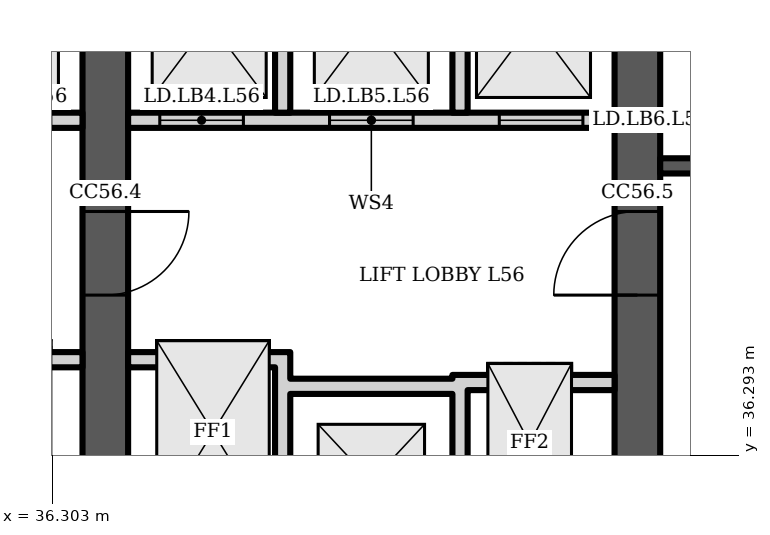
"""IFC4 building model, lengths in metres.
Left out: names, types, materials, properties, quantities, classifications, styles, units other than length and angle.
Written with IfcOpenShell. Run it as: python <this file> out.ifc"""

import sys

from ifc_helpers import new_model, si_unit, direction, frame, frame_2d, origin, place, context, subcontext, project, spatial, polyline, rectangle, outline, extrude, element, fill, save


model = new_model("IFC4")
c1 = context("Model", 3, precision=1e-05, world=origin(), true_north=direction((0.0, 1.0)))
c2 = subcontext(c1, "Body", "Model", "MODEL_VIEW")
j1 = project(units=[si_unit("LENGTHUNIT", "METRE"), si_unit("PLANEANGLEUNIT", "RADIAN")], contexts=[c1])
p1 = place(None, origin())
s1 = spatial("IfcSite", under=j1, at=p1, CompositionType="ELEMENT")
p2 = place(p1, origin())
s2 = spatial("IfcBuilding", under=s1, at=p2, CompositionType="ELEMENT")
p3 = place(p2, frame((0.0, 0.0, 225.1)))
s3 = spatial("IfcBuildingStorey", under=s2, at=p3, CompositionType="ELEMENT", Elevation=225.1)
p4 = place(p3, frame((37.0, 34.6, 0.0), z_axis=(0.0, 0.0, 1.0), x_axis=(0.0, 1.0, 0.0)))
e1 = element("IfcWall", 1, at=p4, inside=s3, PredefinedType="SHEAR", context=c2, shape_type="SweptSolid", body=[
    extrude(rectangle(XDim=14.784, YDim=0.6, at=frame_2d((7.392, 0.0))), origin(), (0.0, 0.0, 1.0), 3.6),
])
p5 = place(p4, frame((11.302, 0.0, 0.0)))
e2 = element("IfcOpeningElement", 2, at=p5, cuts=e1, PredefinedType="OPENING", context=c2, shape_type="SweptSolid", body=[
    extrude(rectangle(XDim=1.0, YDim=2.1, at=frame_2d((0.5, 1.05))), frame((0.0, 0.31, 0.0), z_axis=(0.0, -1.0, 0.0), x_axis=(1.0, 0.0, 0.0)), (0.0, 0.0, 1.0), 0.62),
])
p6 = place(p4, frame((3.8, 0.0, 0.0)))
e3 = element("IfcOpeningElement", 3, at=p6, cuts=e1, PredefinedType="OPENING", context=c2, shape_type="SweptSolid", body=[
    extrude(rectangle(XDim=1.1, YDim=2.1, at=frame_2d((0.55, 1.05))), frame((0.0, 0.31, 0.0), z_axis=(0.0, -1.0, 0.0), x_axis=(1.0, 0.0, 0.0)), (0.0, 0.0, 1.0), 0.62),
])
p7 = place(p3, frame((44.0, 34.6, 0.0), z_axis=(0.0, 0.0, 1.0), x_axis=(0.0, 1.0, 0.0)))
e4 = element("IfcWall", 4, at=p7, inside=s3, PredefinedType="SHEAR", context=c2, shape_type="SweptSolid", body=[
    extrude(rectangle(XDim=14.784, YDim=0.6, at=frame_2d((7.392, 0.0))), origin(), (0.0, 0.0, 1.0), 3.6),
])
p8 = place(p7, frame((11.608, 0.0, 0.0)))
e5 = element("IfcOpeningElement", 5, at=p8, cuts=e4, PredefinedType="OPENING", context=c2, shape_type="SweptSolid", body=[
    extrude(rectangle(XDim=1.0, YDim=2.1, at=frame_2d((0.5, 1.05))), frame((0.0, 0.31, 0.0), z_axis=(0.0, -1.0, 0.0), x_axis=(1.0, 0.0, 0.0)), (0.0, 0.0, 1.0), 0.62),
])
p9 = place(p7, frame((3.8, 0.0, 0.0)))
e6 = element("IfcOpeningElement", 6, at=p9, cuts=e4, PredefinedType="OPENING", context=c2, shape_type="SweptSolid", body=[
    extrude(rectangle(XDim=1.1, YDim=2.1, at=frame_2d((0.55, 1.05))), frame((0.0, 0.31, 0.0), z_axis=(0.0, -1.0, 0.0), x_axis=(1.0, 0.0, 0.0)), (0.0, 0.0, 1.0), 0.62),
])
p10 = place(p3, frame((30.3, 40.7, 0.0), z_axis=(0.0, 0.0, 1.0), x_axis=(1.0, 0.0, 0.0)))
e7 = element("IfcWall", 7, at=p10, inside=s3, PredefinedType="PARTITIONING", context=c2, shape_type="SweptSolid", body=[
    extrude(rectangle(XDim=6.4, YDim=0.2, at=frame_2d((3.2, 0.0))), origin(), (0.0, 0.0, 1.0), 3.2),
])
p11 = place(p10, frame((0.417, 0.0, 0.0)))
e8 = element("IfcOpeningElement", 8, at=p11, cuts=e7, PredefinedType="OPENING", context=c2, shape_type="SweptSolid", body=[
    extrude(rectangle(XDim=1.1, YDim=2.1, at=frame_2d((0.55, 1.05))), frame((0.0, 0.11, 0.0), z_axis=(0.0, -1.0, 0.0), x_axis=(1.0, 0.0, 0.0)), (0.0, 0.0, 1.0), 0.22),
])
p12 = place(p10, frame((2.65, 0.0, 0.0)))
e9 = element("IfcOpeningElement", 9, at=p12, cuts=e7, PredefinedType="OPENING", context=c2, shape_type="SweptSolid", body=[
    extrude(rectangle(XDim=1.1, YDim=2.1, at=frame_2d((0.55, 1.05))), frame((0.0, 0.11, 0.0), z_axis=(0.0, -1.0, 0.0), x_axis=(1.0, 0.0, 0.0)), (0.0, 0.0, 1.0), 0.22),
])
p13 = place(p10, frame((4.883, 0.0, 0.0)))
e10 = element("IfcOpeningElement", 10, at=p13, cuts=e7, PredefinedType="OPENING", context=c2, shape_type="SweptSolid", body=[
    extrude(rectangle(XDim=1.1, YDim=2.1, at=frame_2d((0.55, 1.05))), frame((0.0, 0.11, 0.0), z_axis=(0.0, -1.0, 0.0), x_axis=(1.0, 0.0, 0.0)), (0.0, 0.0, 1.0), 0.22),
])
p14 = place(p3, frame((0.0, 0.0, -0.0)))
e11 = element("IfcWall", 11, at=p14, inside=s3, PredefinedType="PARTITIONING", context=c2, shape_type="SweptSolid", body=[
    extrude(outline(polyline([(34.567, 37.65), (34.767, 37.65), (36.7, 37.65), (36.7, 37.45), (34.767, 37.45), (34.767, 34.6), (34.567, 34.6), (34.567, 37.65)])), origin(), (0.0, 0.0, 1.0), 3.2),
])
p15 = place(p3, frame((0.0, 0.0, -0.0)))
e12 = element("IfcWall", 12, at=p15, inside=s3, PredefinedType="PARTITIONING", context=c2, shape_type="SweptSolid", body=[
    extrude(outline(polyline([(32.433, 40.8), (32.233, 40.8), (32.233, 43.8), (30.3, 43.8), (30.3, 44.0), (36.7, 44.0), (36.7, 43.8), (34.767, 43.8), (34.767, 40.8), (34.567, 40.8), (34.567, 43.8), (32.433, 43.8), (32.433, 40.8)])), origin(), (0.0, 0.0, 1.0), 3.2),
])
p16 = place(p3, frame((37.3, 40.7, 0.0), z_axis=(0.0, 0.0, 1.0), x_axis=(1.0, 0.0, 0.0)))
e13 = element("IfcWall", 13, at=p16, inside=s3, PredefinedType="PARTITIONING", context=c2, shape_type="SweptSolid", body=[
    extrude(rectangle(XDim=6.4, YDim=0.2, at=frame_2d((3.2, 0.0))), origin(), (0.0, 0.0, 1.0), 3.2),
])
p17 = place(p16, frame((0.417, 0.0, 0.0)))
e14 = element("IfcOpeningElement", 14, at=p17, cuts=e13, PredefinedType="OPENING", context=c2, shape_type="SweptSolid", body=[
    extrude(rectangle(XDim=1.1, YDim=2.1, at=frame_2d((0.55, 1.05))), frame((0.0, 0.11, 0.0), z_axis=(0.0, -1.0, 0.0), x_axis=(1.0, 0.0, 0.0)), (0.0, 0.0, 1.0), 0.22),
])
p18 = place(p16, frame((2.65, 0.0, 0.0)))
e15 = element("IfcOpeningElement", 15, at=p18, cuts=e13, PredefinedType="OPENING", context=c2, shape_type="SweptSolid", body=[
    extrude(rectangle(XDim=1.1, YDim=2.1, at=frame_2d((0.55, 1.05))), frame((0.0, 0.11, 0.0), z_axis=(0.0, -1.0, 0.0), x_axis=(1.0, 0.0, 0.0)), (0.0, 0.0, 1.0), 0.22),
])
p19 = place(p16, frame((4.883, 0.0, 0.0)))
e16 = element("IfcOpeningElement", 16, at=p19, cuts=e13, PredefinedType="OPENING", context=c2, shape_type="SweptSolid", body=[
    extrude(rectangle(XDim=1.1, YDim=2.1, at=frame_2d((0.55, 1.05))), frame((0.0, 0.11, 0.0), z_axis=(0.0, -1.0, 0.0), x_axis=(1.0, 0.0, 0.0)), (0.0, 0.0, 1.0), 0.22),
])
p20 = place(p3, frame((0.0, 0.0, -0.0)))
e17 = element("IfcWall", 17, at=p20, inside=s3, PredefinedType="PARTITIONING", context=c2, shape_type="SweptSolid", body=[
    extrude(outline(polyline([(41.567, 37.1), (39.433, 37.1), (39.433, 34.6), (39.233, 34.6), (39.233, 37.45), (37.3, 37.45), (37.3, 37.65), (39.233, 37.65), (39.433, 37.65), (39.433, 37.3), (41.567, 37.3), (41.567, 37.35), (41.767, 37.35), (43.7, 37.35), (43.7, 37.15), (41.767, 37.15), (41.767, 34.6), (41.567, 34.6), (41.567, 37.1)])), origin(), (0.0, 0.0, 1.0), 3.2),
])
p21 = place(p3, frame((0.0, 0.0, -0.0)))
e18 = element("IfcWall", 18, at=p21, inside=s3, PredefinedType="PARTITIONING", context=c2, shape_type="SweptSolid", body=[
    extrude(outline(polyline([(39.433, 40.8), (39.233, 40.8), (39.233, 43.8), (37.3, 43.8), (37.3, 44.0), (43.7, 44.0), (43.7, 43.8), (41.767, 43.8), (41.767, 40.8), (41.567, 40.8), (41.567, 43.8), (39.433, 43.8), (39.433, 40.8)])), origin(), (0.0, 0.0, 1.0), 3.2),
])
p22 = place(p3, frame((44.3, 40.1, 0.0), z_axis=(0.0, 0.0, 1.0), x_axis=(1.0, 0.0, 0.0)))
e19 = element("IfcWall", 19, at=p22, inside=s3, PredefinedType="SHEAR", context=c2, shape_type="SweptSolid", body=[
    extrude(rectangle(XDim=6.4, YDim=0.2, at=frame_2d((3.2, 0.0))), origin(), (0.0, 0.0, 1.0), 3.2),
])
p23 = place(p22, frame((3.625, 0.0, 0.0)))
e20 = element("IfcOpeningElement", 20, at=p23, cuts=e19, PredefinedType="OPENING", context=c2, shape_type="SweptSolid", body=[
    extrude(rectangle(XDim=1.2, YDim=2.1, at=frame_2d((0.6, 1.05))), frame((0.0, 0.11, 0.0), z_axis=(0.0, -1.0, 0.0), x_axis=(1.0, 0.0, 0.0)), (0.0, 0.0, 1.0), 0.22),
])
p24 = place(p22, frame((0.625, 0.0, 0.0)))
e21 = element("IfcOpeningElement", 21, at=p24, cuts=e19, PredefinedType="OPENING", context=c2, shape_type="SweptSolid", body=[
    extrude(rectangle(XDim=0.9, YDim=2.1, at=frame_2d((0.45, 1.05))), frame((0.0, 0.11, 0.0), z_axis=(0.0, -1.0, 0.0), x_axis=(1.0, 0.0, 0.0)), (0.0, 0.0, 1.0), 0.22),
])
p25 = place(p17, origin())
e22 = element("IfcDoor", 22, at=p25, inside=s3, OperationType="DOUBLE_DOOR_SLIDING", PredefinedType="DOOR", context=c2, shape_type="SweptSolid", body=[
    extrude(rectangle(XDim=1.1, YDim=2.1, at=frame_2d((0.55, 1.05))), frame((0.0, 0.025, 0.0), z_axis=(0.0, -1.0, 0.0), x_axis=(1.0, 0.0, 0.0)), (0.0, 0.0, 1.0), 0.05),
])
fill(e14, e22)
p26 = place(p18, origin())
e23 = element("IfcDoor", 23, at=p26, inside=s3, OperationType="DOUBLE_DOOR_SLIDING", PredefinedType="DOOR", context=c2, shape_type="SweptSolid", body=[
    extrude(rectangle(XDim=1.1, YDim=2.1, at=frame_2d((0.55, 1.05))), frame((0.0, 0.025, 0.0), z_axis=(0.0, -1.0, 0.0), x_axis=(1.0, 0.0, 0.0)), (0.0, 0.0, 1.0), 0.05),
])
fill(e15, e23)
p27 = place(p19, origin())
e24 = element("IfcDoor", 24, at=p27, inside=s3, OperationType="DOUBLE_DOOR_SLIDING", PredefinedType="DOOR", context=c2, shape_type="SweptSolid", body=[
    extrude(rectangle(XDim=1.1, YDim=2.1, at=frame_2d((0.55, 1.05))), frame((0.0, 0.025, 0.0), z_axis=(0.0, -1.0, 0.0), x_axis=(1.0, 0.0, 0.0)), (0.0, 0.0, 1.0), 0.05),
])
fill(e16, e24)
p28 = place(p6, origin())
e25 = element("IfcDoor", 25, at=p28, inside=s3, OperationType="SINGLE_SWING_RIGHT", PredefinedType="DOOR", context=c2, shape_type="SweptSolid", body=[
    extrude(rectangle(XDim=1.1, YDim=2.1, at=frame_2d((0.55, 1.05))), frame((0.0, 0.025, 0.0), z_axis=(0.0, -1.0, 0.0), x_axis=(1.0, 0.0, 0.0)), (0.0, 0.0, 1.0), 0.05),
])
fill(e3, e25)
p29 = place(p9, origin())
e26 = element("IfcDoor", 26, at=p29, inside=s3, OperationType="SINGLE_SWING_LEFT", PredefinedType="DOOR", context=c2, shape_type="SweptSolid", body=[
    extrude(rectangle(XDim=1.1, YDim=2.1, at=frame_2d((0.55, 1.05))), frame((0.0, 0.025, 0.0), z_axis=(0.0, -1.0, 0.0), x_axis=(1.0, 0.0, 0.0)), (0.0, 0.0, 1.0), 0.05),
])
fill(e6, e26)
save(model, sys.argv[1])
